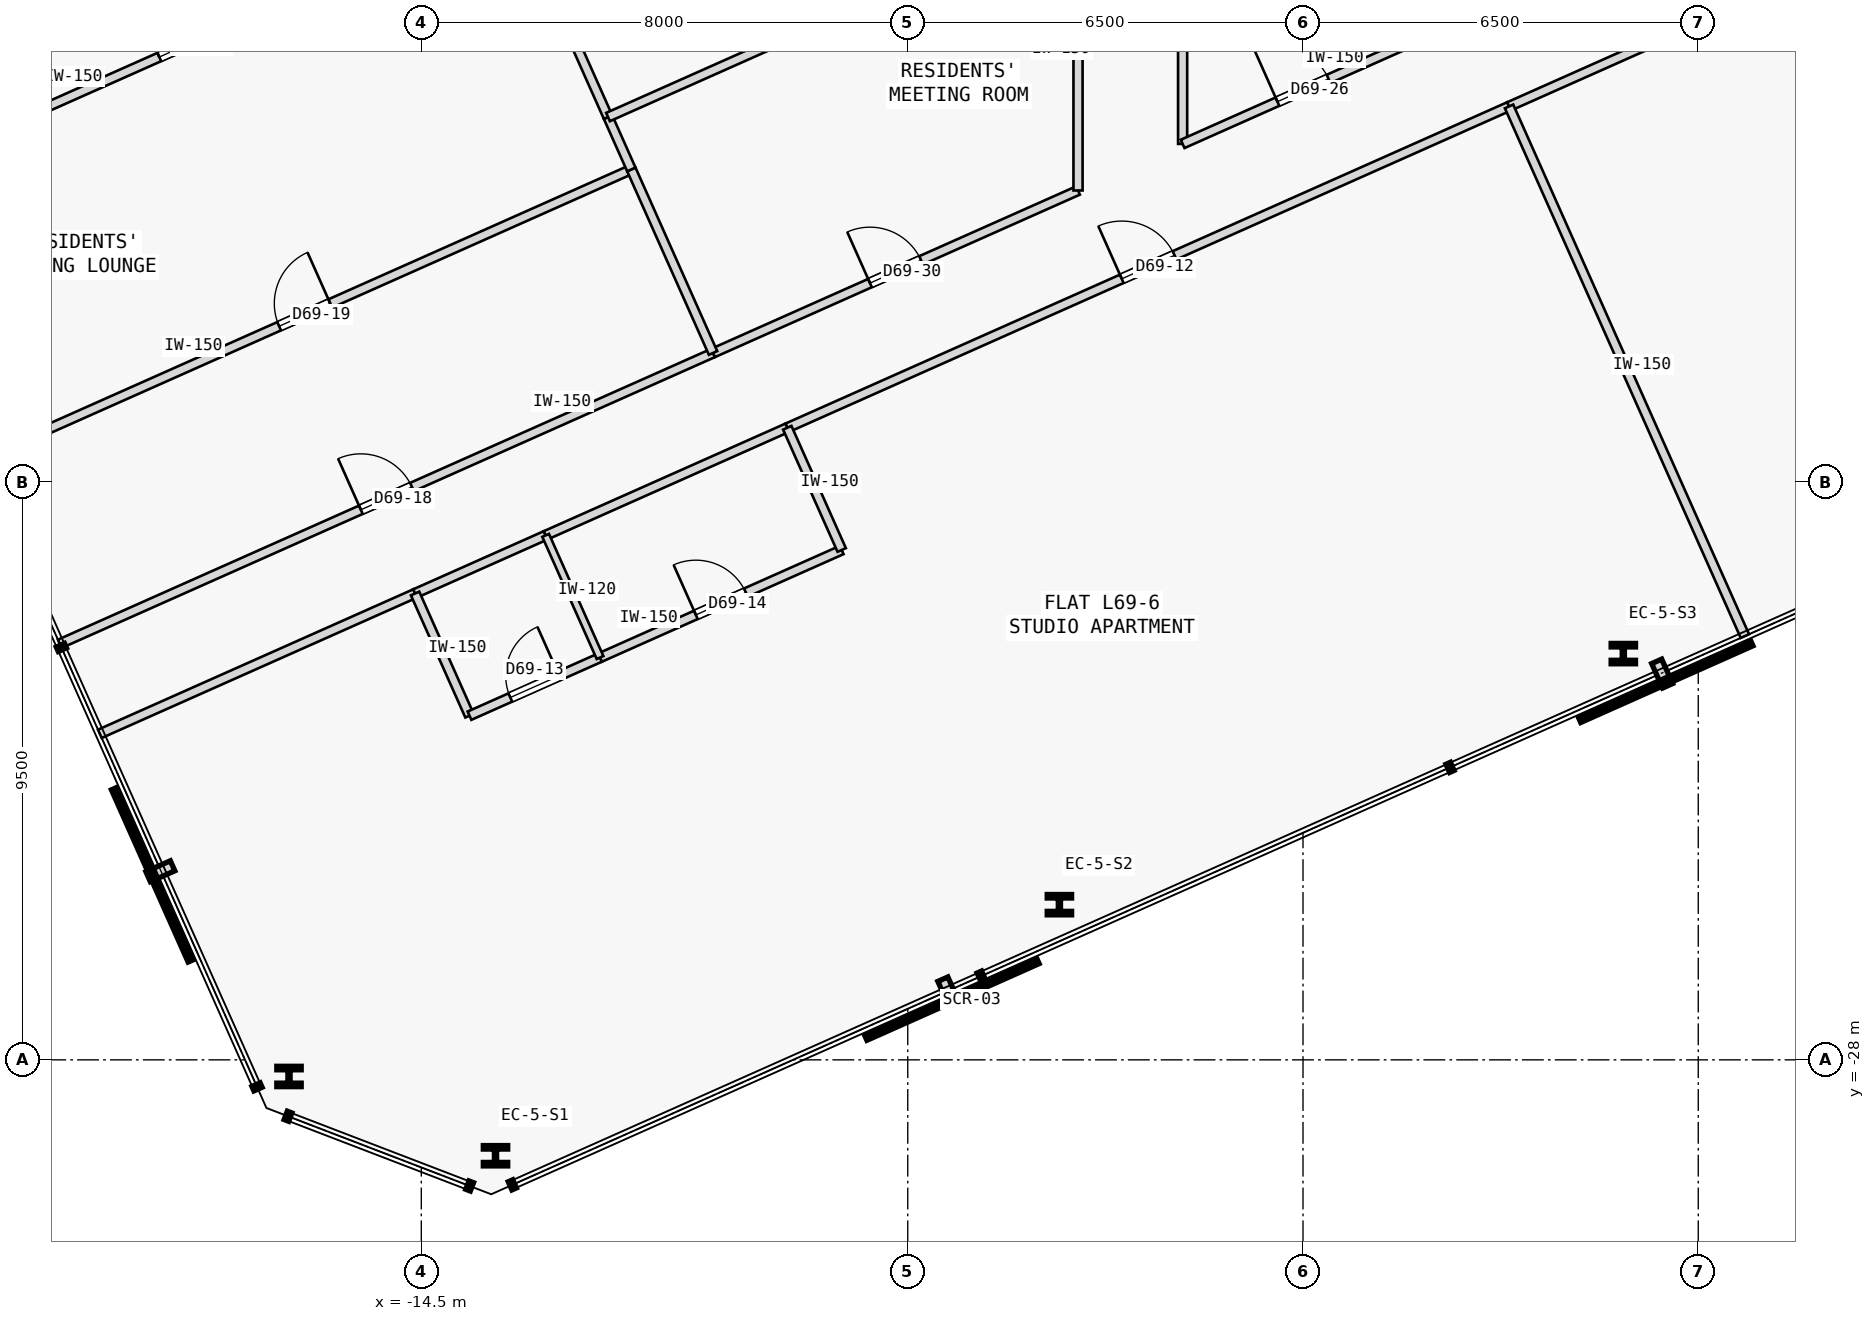
"""IFC4 building model, lengths in metres.
Left out: names, types, materials, properties, quantities, classifications, styles, units other than length and angle.
Written with IfcOpenShell. Run it as: python <this file> out.ifc"""

import sys

from ifc_helpers import new_model, si_unit, direction, frame, frame_2d, origin, origin_2d, place, context, subcontext, project, spatial, rectangle, i_section, extrude, element, fill, save


model = new_model("IFC4")
c1 = context("Model", 3, precision=1e-05, world=origin(), true_north=direction((0.0, 1.0)))
c2 = subcontext(c1, "Body", "Model", "MODEL_VIEW")
j1 = project(units=[si_unit("LENGTHUNIT", "METRE"), si_unit("PLANEANGLEUNIT", "RADIAN")], contexts=[c1])
p1 = place(None, origin())
s1 = spatial("IfcSite", under=j1, at=p1, CompositionType="ELEMENT")
p2 = place(p1, origin())
s2 = spatial("IfcBuilding", under=s1, at=p2, CompositionType="ELEMENT")
p3 = place(p2, frame((0.0, 0.0, 258.85)))
s3 = spatial("IfcBuildingStorey", under=s2, at=p3, CompositionType="ELEMENT", Elevation=258.85)
for number, where, z_axis, x_axis in (
    (1, (-13.28, -29.577, 0.0), (0.0, 0.0, 1.0), (1.0, 0.0, 0.0)),
    (2, (-4.006, -25.448, 0.0), (0.0, 0.0, 1.0), (1.0, 0.0, 0.0)),
    (3, (5.268, -21.319, 0.0), (0.0, 0.0, 1.0), (1.0, 0.0, 0.0)),
    (4, (-16.676, -28.273, 0.0), (0.0, 0.0, 1.0), (1.0, 0.0, 0.0)),
):
    element("IfcColumn", number, at=place(p3, frame(where, z_axis=z_axis, x_axis=x_axis)), inside=s3, PredefinedType="COLUMN", context=c2, shape_type="SweptSolid", body=[
        extrude(i_section(OverallWidth=0.401, OverallDepth=0.335, WebThickness=0.036, FlangeThickness=0.058, FilletRadius=0.015, at=origin_2d()), origin(), (0.0, 0.0, 1.0), 3.35),
    ])
p4 = place(p3, frame((-19.786, -22.639, 0.0), z_axis=(0.0, 0.0, 1.0), x_axis=(0.913559465571, 0.406705179295, 0.0)))
e5 = element("IfcWall", 5, at=p4, inside=s3, PredefinedType="PARTITIONING", context=c2, shape_type="SweptSolid", body=[
    extrude(rectangle(XDim=5.675, YDim=0.15, at=frame_2d((2.837, 0.0))), origin(), (0.0, 0.0, 1.0), 3.125),
])
p5 = place(p3, frame((-8.481, -17.605, 0.0), z_axis=(0.0, 0.0, 1.0), x_axis=(0.913546352883, 0.406734632328, 0.0)))
e6 = element("IfcWall", 6, at=p5, inside=s3, PredefinedType="PARTITIONING", context=c2, shape_type="SweptSolid", body=[
    extrude(rectangle(XDim=12.993, YDim=0.15, at=frame_2d((6.497, 0.0))), origin(), (0.0, 0.0, 1.0), 3.125),
])
p6 = place(p5, frame((6.021, 0.0, 0.0)))
e7 = element("IfcOpeningElement", 7, at=p6, cuts=e6, PredefinedType="OPENING", context=c2, shape_type="SweptSolid", body=[
    extrude(rectangle(XDim=0.95, YDim=2.15, at=frame_2d((0.475, 1.075))), frame((0.0, 0.085, 0.0), z_axis=(0.0, -1.0, 0.0), x_axis=(1.0, 0.0, 0.0)), (0.0, 0.0, 1.0), 0.17),
])
p7 = place(p3, frame((-14.602, -20.331, 0.0), z_axis=(0.0, 0.0, 1.0), x_axis=(0.913502828817, 0.406832375486, 0.0)))
e8 = element("IfcWall", 8, at=p7, inside=s3, PredefinedType="PARTITIONING", context=c2, shape_type="SweptSolid", body=[
    extrude(rectangle(XDim=2.35, YDim=0.15, at=frame_2d((1.175, 0.0))), origin(), (0.0, 0.0, 1.0), 3.125),
])
p8 = place(p3, frame((-12.455, -19.375, 0.0), z_axis=(0.0, 0.0, 1.0), x_axis=(0.913545193015, 0.406737237438, 0.0)))
e9 = element("IfcWall", 9, at=p8, inside=s3, PredefinedType="PARTITIONING", context=c2, shape_type="SweptSolid", body=[
    extrude(rectangle(XDim=4.35, YDim=0.15, at=frame_2d((2.175, 0.0))), origin(), (0.0, 0.0, 1.0), 3.125),
])
p9 = place(p3, frame((3.388, -12.321, 0.0), z_axis=(0.0, 0.0, 1.0), x_axis=(0.913552886643, 0.406719956857, 0.0)))
e10 = element("IfcWall", 10, at=p9, inside=s3, PredefinedType="PARTITIONING", context=c2, shape_type="SweptSolid", body=[
    extrude(rectangle(XDim=6.933, YDim=0.15, at=frame_2d((3.467, 0.0))), origin(), (0.0, 0.0, 1.0), 3.125),
])
p10 = place(p3, frame((-20.445, -21.159, 0.0), z_axis=(0.0, 0.0, 1.0), x_axis=(0.913547681516, 0.406731648137, 0.0)))
e11 = element("IfcWall", 11, at=p10, inside=s3, PredefinedType="PARTITIONING", context=c2, shape_type="SweptSolid", body=[
    extrude(rectangle(XDim=11.76, YDim=0.15, at=frame_2d((5.88, 0.0))), origin(), (0.0, 0.0, 1.0), 3.125),
])
p11 = place(p10, frame((5.42, 0.0, 0.0)))
e12 = element("IfcOpeningElement", 12, at=p11, cuts=e11, PredefinedType="OPENING", context=c2, shape_type="SweptSolid", body=[
    extrude(rectangle(XDim=0.92, YDim=2.15, at=frame_2d((0.46, 1.075))), frame((0.0, 0.085, 0.0), z_axis=(0.0, -1.0, 0.0), x_axis=(1.0, 0.0, 0.0)), (0.0, 0.0, 1.0), 0.17),
])
p12 = place(p3, frame((-1.98, -12.938, 0.0), z_axis=(0.0, 0.0, 1.0), x_axis=(-9.3049223e-05, 0.999999995671, 0.0)))
e13 = element("IfcWall", 13, at=p12, inside=s3, PredefinedType="PARTITIONING", context=c2, shape_type="SweptSolid", body=[
    extrude(rectangle(XDim=2.624, YDim=0.15, at=frame_2d((1.312, 0.0))), origin(), (0.0, 0.0, 1.0), 3.125),
])
p13 = place(p3, frame((-1.98, -12.938, 0.0), z_axis=(0.0, 0.0, 1.0), x_axis=(0.913530252303, 0.406770793111, 0.0)))
e14 = element("IfcWall", 14, at=p13, inside=s3, PredefinedType="PARTITIONING", context=c2, shape_type="SweptSolid", body=[
    extrude(rectangle(XDim=4.334, YDim=0.15, at=frame_2d((2.167, 0.0))), origin(), (0.0, 0.0, 1.0), 3.125),
])
p14 = place(p13, frame((1.707, 0.0, 0.0)))
e15 = element("IfcOpeningElement", 15, at=p14, cuts=e14, PredefinedType="OPENING", context=c2, shape_type="SweptSolid", body=[
    extrude(rectangle(XDim=0.92, YDim=2.15, at=frame_2d((0.46, 1.075))), frame((0.0, 0.085, 0.0), z_axis=(0.0, -1.0, 0.0), x_axis=(1.0, 0.0, 0.0)), (0.0, 0.0, 1.0), 0.17),
])
p15 = place(p3, frame((-9.702, -16.375, 0.0), z_axis=(0.0, 0.0, 1.0), x_axis=(0.913552389019, 0.406721074594, 0.0)))
e16 = element("IfcWall", 16, at=p15, inside=s3, PredefinedType="PARTITIONING", context=c2, shape_type="SweptSolid", body=[
    extrude(rectangle(XDim=6.57, YDim=0.15, at=frame_2d((3.285, 0.0))), origin(), (0.0, 0.0, 1.0), 3.125),
])
p16 = place(p15, frame((2.825, 0.0, 0.0)))
e17 = element("IfcOpeningElement", 17, at=p16, cuts=e16, PredefinedType="OPENING", context=c2, shape_type="SweptSolid", body=[
    extrude(rectangle(XDim=0.92, YDim=2.15, at=frame_2d((0.46, 1.075))), frame((0.0, 0.085, 0.0), z_axis=(0.0, -1.0, 0.0), x_axis=(1.0, 0.0, 0.0)), (0.0, 0.0, 1.0), 0.17),
])
p17 = place(p3, frame((-3.7, -13.703, 0.0), z_axis=(0.0, 0.0, 1.0), x_axis=(5.2512734e-05, 0.999999998621, 0.0)))
e18 = element("IfcWall", 18, at=p17, inside=s3, PredefinedType="PARTITIONING", context=c2, shape_type="SweptSolid", body=[
    extrude(rectangle(XDim=4.649, YDim=0.15, at=frame_2d((2.325, 0.0))), origin(), (0.0, 0.0, 1.0), 3.125),
])
p18 = place(p3, frame((-13.707, -22.34, 0.0), z_axis=(0.0, 0.0, 1.0), x_axis=(-0.406725294076, 0.913550510459, 0.0)))
e19 = element("IfcWall", 19, at=p18, inside=s3, PredefinedType="PARTITIONING", context=c2, shape_type="SweptSolid", body=[
    extrude(rectangle(XDim=2.2, YDim=0.15, at=frame_2d((1.1, 0.0))), origin(), (0.0, 0.0, 1.0), 3.125),
])
p19 = place(p3, frame((-13.707, -22.34, 0.0), z_axis=(0.0, 0.0, 1.0), x_axis=(0.913541436194, 0.406745675276, 0.0)))
e20 = element("IfcWall", 20, at=p19, inside=s3, PredefinedType="PARTITIONING", context=c2, shape_type="SweptSolid", body=[
    extrude(rectangle(XDim=2.35, YDim=0.15, at=frame_2d((1.175, 0.0))), origin(), (0.0, 0.0, 1.0), 3.125),
])
p20 = place(p19, frame((0.735, 0.0, 0.0)))
e21 = element("IfcOpeningElement", 21, at=p20, cuts=e20, PredefinedType="OPENING", context=c2, shape_type="SweptSolid", body=[
    extrude(rectangle(XDim=0.88, YDim=2.15, at=frame_2d((0.44, 1.075))), frame((0.0, 0.085, 0.0), z_axis=(0.0, -1.0, 0.0), x_axis=(1.0, 0.0, 0.0)), (0.0, 0.0, 1.0), 0.17),
])
p21 = place(p3, frame((-11.56, -21.385, 0.0), z_axis=(0.0, 0.0, 1.0), x_axis=(0.913533624044, 0.406763220732, 0.0)))
e22 = element("IfcWall", 22, at=p21, inside=s3, PredefinedType="PARTITIONING", context=c2, shape_type="SweptSolid", body=[
    extrude(rectangle(XDim=4.35, YDim=0.15, at=frame_2d((2.175, 0.0))), origin(), (0.0, 0.0, 1.0), 3.125),
])
p22 = place(p21, frame((1.725, 0.0, 0.0)))
e23 = element("IfcOpeningElement", 23, at=p22, cuts=e22, PredefinedType="OPENING", context=c2, shape_type="SweptSolid", body=[
    extrude(rectangle(XDim=0.9, YDim=2.15, at=frame_2d((0.45, 1.075))), frame((0.0, 0.085, 0.0), z_axis=(0.0, -1.0, 0.0), x_axis=(1.0, 0.0, 0.0)), (0.0, 0.0, 1.0), 0.17),
])
p23 = place(p3, frame((-7.586, -19.615, 0.0), z_axis=(0.0, 0.0, 1.0), x_axis=(-0.406817905151, 0.913509273105, 0.0)))
e24 = element("IfcWall", 24, at=p23, inside=s3, PredefinedType="PARTITIONING", context=c2, shape_type="SweptSolid", body=[
    extrude(rectangle(XDim=2.2, YDim=0.15, at=frame_2d((1.1, 0.0))), origin(), (0.0, 0.0, 1.0), 3.125),
])
p24 = place(p3, frame((7.267, -21.031, 0.0), z_axis=(0.0, 0.0, 1.0), x_axis=(-0.406751296215, 0.913538933504, 0.0)))
e25 = element("IfcWall", 25, at=p24, inside=s3, PredefinedType="PARTITIONING", context=c2, shape_type="SweptSolid", body=[
    extrude(rectangle(XDim=9.535, YDim=0.15, at=frame_2d((4.768, 0.0))), origin(), (0.0, 0.0, 1.0), 3.125),
])
p25 = place(p3, frame((-11.56, -21.385, 0.0), z_axis=(0.0, 0.0, 1.0), x_axis=(-0.406684063321, 0.913568865845, 0.0)))
e26 = element("IfcWall", 26, at=p25, inside=s3, PredefinedType="PARTITIONING", context=c2, shape_type="SweptSolid", body=[
    extrude(rectangle(XDim=2.2, YDim=0.12, at=frame_2d((1.1, 0.0))), origin(), (0.0, 0.0, 1.0), 3.125),
])
p26 = place(p3, frame((-21.789, -18.14, 0.0), z_axis=(0.0, 0.0, 1.0), x_axis=(0.913544247064, 0.406739362069, 0.0)))
e27 = element("IfcWall", 27, at=p26, inside=s3, PredefinedType="PARTITIONING", context=c2, shape_type="SweptSolid", body=[
    extrude(rectangle(XDim=11.76, YDim=0.15, at=frame_2d((5.88, 0.0))), origin(), (0.0, 0.0, 1.0), 3.125),
])
p27 = place(p26, frame((5.42, 0.0, 0.0)))
e28 = element("IfcOpeningElement", 28, at=p27, cuts=e27, PredefinedType="OPENING", context=c2, shape_type="SweptSolid", body=[
    extrude(rectangle(XDim=0.92, YDim=2.15, at=frame_2d((0.46, 1.075))), frame((0.0, 0.085, 0.0), z_axis=(0.0, -1.0, 0.0), x_axis=(1.0, 0.0, 0.0)), (0.0, 0.0, 1.0), 0.17),
])
p28 = place(p3, frame((-9.702, -16.375, 0.0), z_axis=(0.0, 0.0, 1.0), x_axis=(-0.406775972158, 0.913527946193, 0.0)))
e29 = element("IfcWall", 29, at=p28, inside=s3, PredefinedType="PARTITIONING", context=c2, shape_type="SweptSolid", body=[
    extrude(rectangle(XDim=3.304, YDim=0.15, at=frame_2d((1.652, 0.0))), origin(), (0.0, 0.0, 1.0), 3.125),
])
p29 = place(p3, frame((-23.76, -13.713, 0.0), z_axis=(0.0, 0.0, 1.0), x_axis=(0.913544247064, 0.406739362069, 0.0)))
e30 = element("IfcWall", 30, at=p29, inside=s3, PredefinedType="PARTITIONING", context=c2, shape_type="SweptSolid", body=[
    extrude(rectangle(XDim=11.76, YDim=0.15, at=frame_2d((5.88, 0.0))), origin(), (0.0, 0.0, 1.0), 3.125),
])
p30 = place(p29, frame((5.42, 0.0, 0.0)))
e31 = element("IfcOpeningElement", 31, at=p30, cuts=e30, PredefinedType="OPENING", context=c2, shape_type="SweptSolid", body=[
    extrude(rectangle(XDim=0.92, YDim=2.15, at=frame_2d((0.46, 1.075))), frame((0.0, 0.085, 0.0), z_axis=(0.0, -1.0, 0.0), x_axis=(1.0, 0.0, 0.0)), (0.0, 0.0, 1.0), 0.17),
])
p31 = place(p3, frame((-11.046, -13.357, 0.0), z_axis=(0.0, 0.0, 1.0), x_axis=(-0.406474743084, 0.913662018054, 0.0)))
e32 = element("IfcWall", 32, at=p31, inside=s3, PredefinedType="PARTITIONING", context=c2, shape_type="SweptSolid", body=[
    extrude(rectangle(XDim=0.943, YDim=0.15, at=frame_2d((0.471, 0.0))), origin(), (0.0, 0.0, 1.0), 3.125),
])
p32 = place(p3, frame((-11.429, -12.496, 0.0), z_axis=(0.0, 0.0, 1.0), x_axis=(-0.406782597231, 0.91352499615, 0.0)))
e33 = element("IfcWall", 33, at=p32, inside=s3, PredefinedType="PARTITIONING", context=c2, shape_type="SweptSolid", body=[
    extrude(rectangle(XDim=3.903, YDim=0.15, at=frame_2d((1.951, 0.0))), origin(), (0.0, 0.0, 1.0), 3.125),
])
p33 = place(p3, frame((-11.429, -12.496, 0.0), z_axis=(0.0, 0.0, 1.0), x_axis=(0.913544816238, 0.406738083692, 0.0)))
e34 = element("IfcWall", 34, at=p33, inside=s3, PredefinedType="PARTITIONING", context=c2, shape_type="SweptSolid", body=[
    extrude(rectangle(XDim=8.461, YDim=0.15, at=frame_2d((4.23, 0.0))), origin(), (0.0, 0.0, 1.0), 3.125),
])
p34 = place(p6, origin())
e35 = element("IfcDoor", 35, at=p34, inside=s3, OperationType="SINGLE_SWING_LEFT", PredefinedType="DOOR", context=c2, shape_type="SweptSolid", body=[
    extrude(rectangle(XDim=0.95, YDim=2.15, at=frame_2d((0.475, 1.075))), frame((0.0, 0.025, 0.0), z_axis=(0.0, -1.0, 0.0), x_axis=(1.0, 0.0, 0.0)), (0.0, 0.0, 1.0), 0.05),
])
fill(e7, e35)
p35 = place(p20, origin())
e36 = element("IfcDoor", 36, at=p35, inside=s3, OperationType="SINGLE_SWING_RIGHT", PredefinedType="DOOR", context=c2, shape_type="SweptSolid", body=[
    extrude(rectangle(XDim=0.88, YDim=2.15, at=frame_2d((0.44, 1.075))), frame((0.0, 0.025, 0.0), z_axis=(0.0, -1.0, 0.0), x_axis=(1.0, 0.0, 0.0)), (0.0, 0.0, 1.0), 0.05),
])
fill(e21, e36)
p36 = place(p22, origin())
e37 = element("IfcDoor", 37, at=p36, inside=s3, OperationType="SINGLE_SWING_LEFT", PredefinedType="DOOR", context=c2, shape_type="SweptSolid", body=[
    extrude(rectangle(XDim=0.9, YDim=2.15, at=frame_2d((0.45, 1.075))), frame((0.0, 0.025, 0.0), z_axis=(0.0, -1.0, 0.0), x_axis=(1.0, 0.0, 0.0)), (0.0, 0.0, 1.0), 0.05),
])
fill(e23, e37)
p37 = place(p11, origin())
e38 = element("IfcDoor", 38, at=p37, inside=s3, OperationType="SINGLE_SWING_LEFT", PredefinedType="DOOR", context=c2, shape_type="SweptSolid", body=[
    extrude(rectangle(XDim=0.92, YDim=2.15, at=frame_2d((0.46, 1.075))), frame((0.0, 0.025, 0.0), z_axis=(0.0, -1.0, 0.0), x_axis=(1.0, 0.0, 0.0)), (0.0, 0.0, 1.0), 0.05),
])
fill(e12, e38)
p38 = place(p27, origin())
e39 = element("IfcDoor", 39, at=p38, inside=s3, OperationType="SINGLE_SWING_RIGHT", PredefinedType="DOOR", context=c2, shape_type="SweptSolid", body=[
    extrude(rectangle(XDim=0.92, YDim=2.15, at=frame_2d((0.46, 1.075))), frame((0.0, 0.025, 0.0), z_axis=(0.0, -1.0, 0.0), x_axis=(1.0, 0.0, 0.0)), (0.0, 0.0, 1.0), 0.05),
])
fill(e28, e39)
p39 = place(p30, origin())
e40 = element("IfcDoor", 40, at=p39, inside=s3, OperationType="SINGLE_SWING_LEFT", PredefinedType="DOOR", context=c2, shape_type="SweptSolid", body=[
    extrude(rectangle(XDim=0.92, YDim=2.15, at=frame_2d((0.46, 1.075))), frame((0.0, 0.025, 0.0), z_axis=(0.0, -1.0, 0.0), x_axis=(1.0, 0.0, 0.0)), (0.0, 0.0, 1.0), 0.05),
])
fill(e31, e40)
p40 = place(p14, origin())
e41 = element("IfcDoor", 41, at=p40, inside=s3, OperationType="SINGLE_SWING_LEFT", PredefinedType="DOOR", context=c2, shape_type="SweptSolid", body=[
    extrude(rectangle(XDim=0.92, YDim=2.15, at=frame_2d((0.46, 1.075))), frame((0.0, 0.025, 0.0), z_axis=(0.0, -1.0, 0.0), x_axis=(1.0, 0.0, 0.0)), (0.0, 0.0, 1.0), 0.05),
])
fill(e15, e41)
p41 = place(p16, origin())
e42 = element("IfcDoor", 42, at=p41, inside=s3, OperationType="SINGLE_SWING_LEFT", PredefinedType="DOOR", context=c2, shape_type="SweptSolid", body=[
    extrude(rectangle(XDim=0.92, YDim=2.15, at=frame_2d((0.46, 1.075))), frame((0.0, 0.025, 0.0), z_axis=(0.0, -1.0, 0.0), x_axis=(1.0, 0.0, 0.0)), (0.0, 0.0, 1.0), 0.05),
])
fill(e17, e42)
save(model, sys.argv[1])
